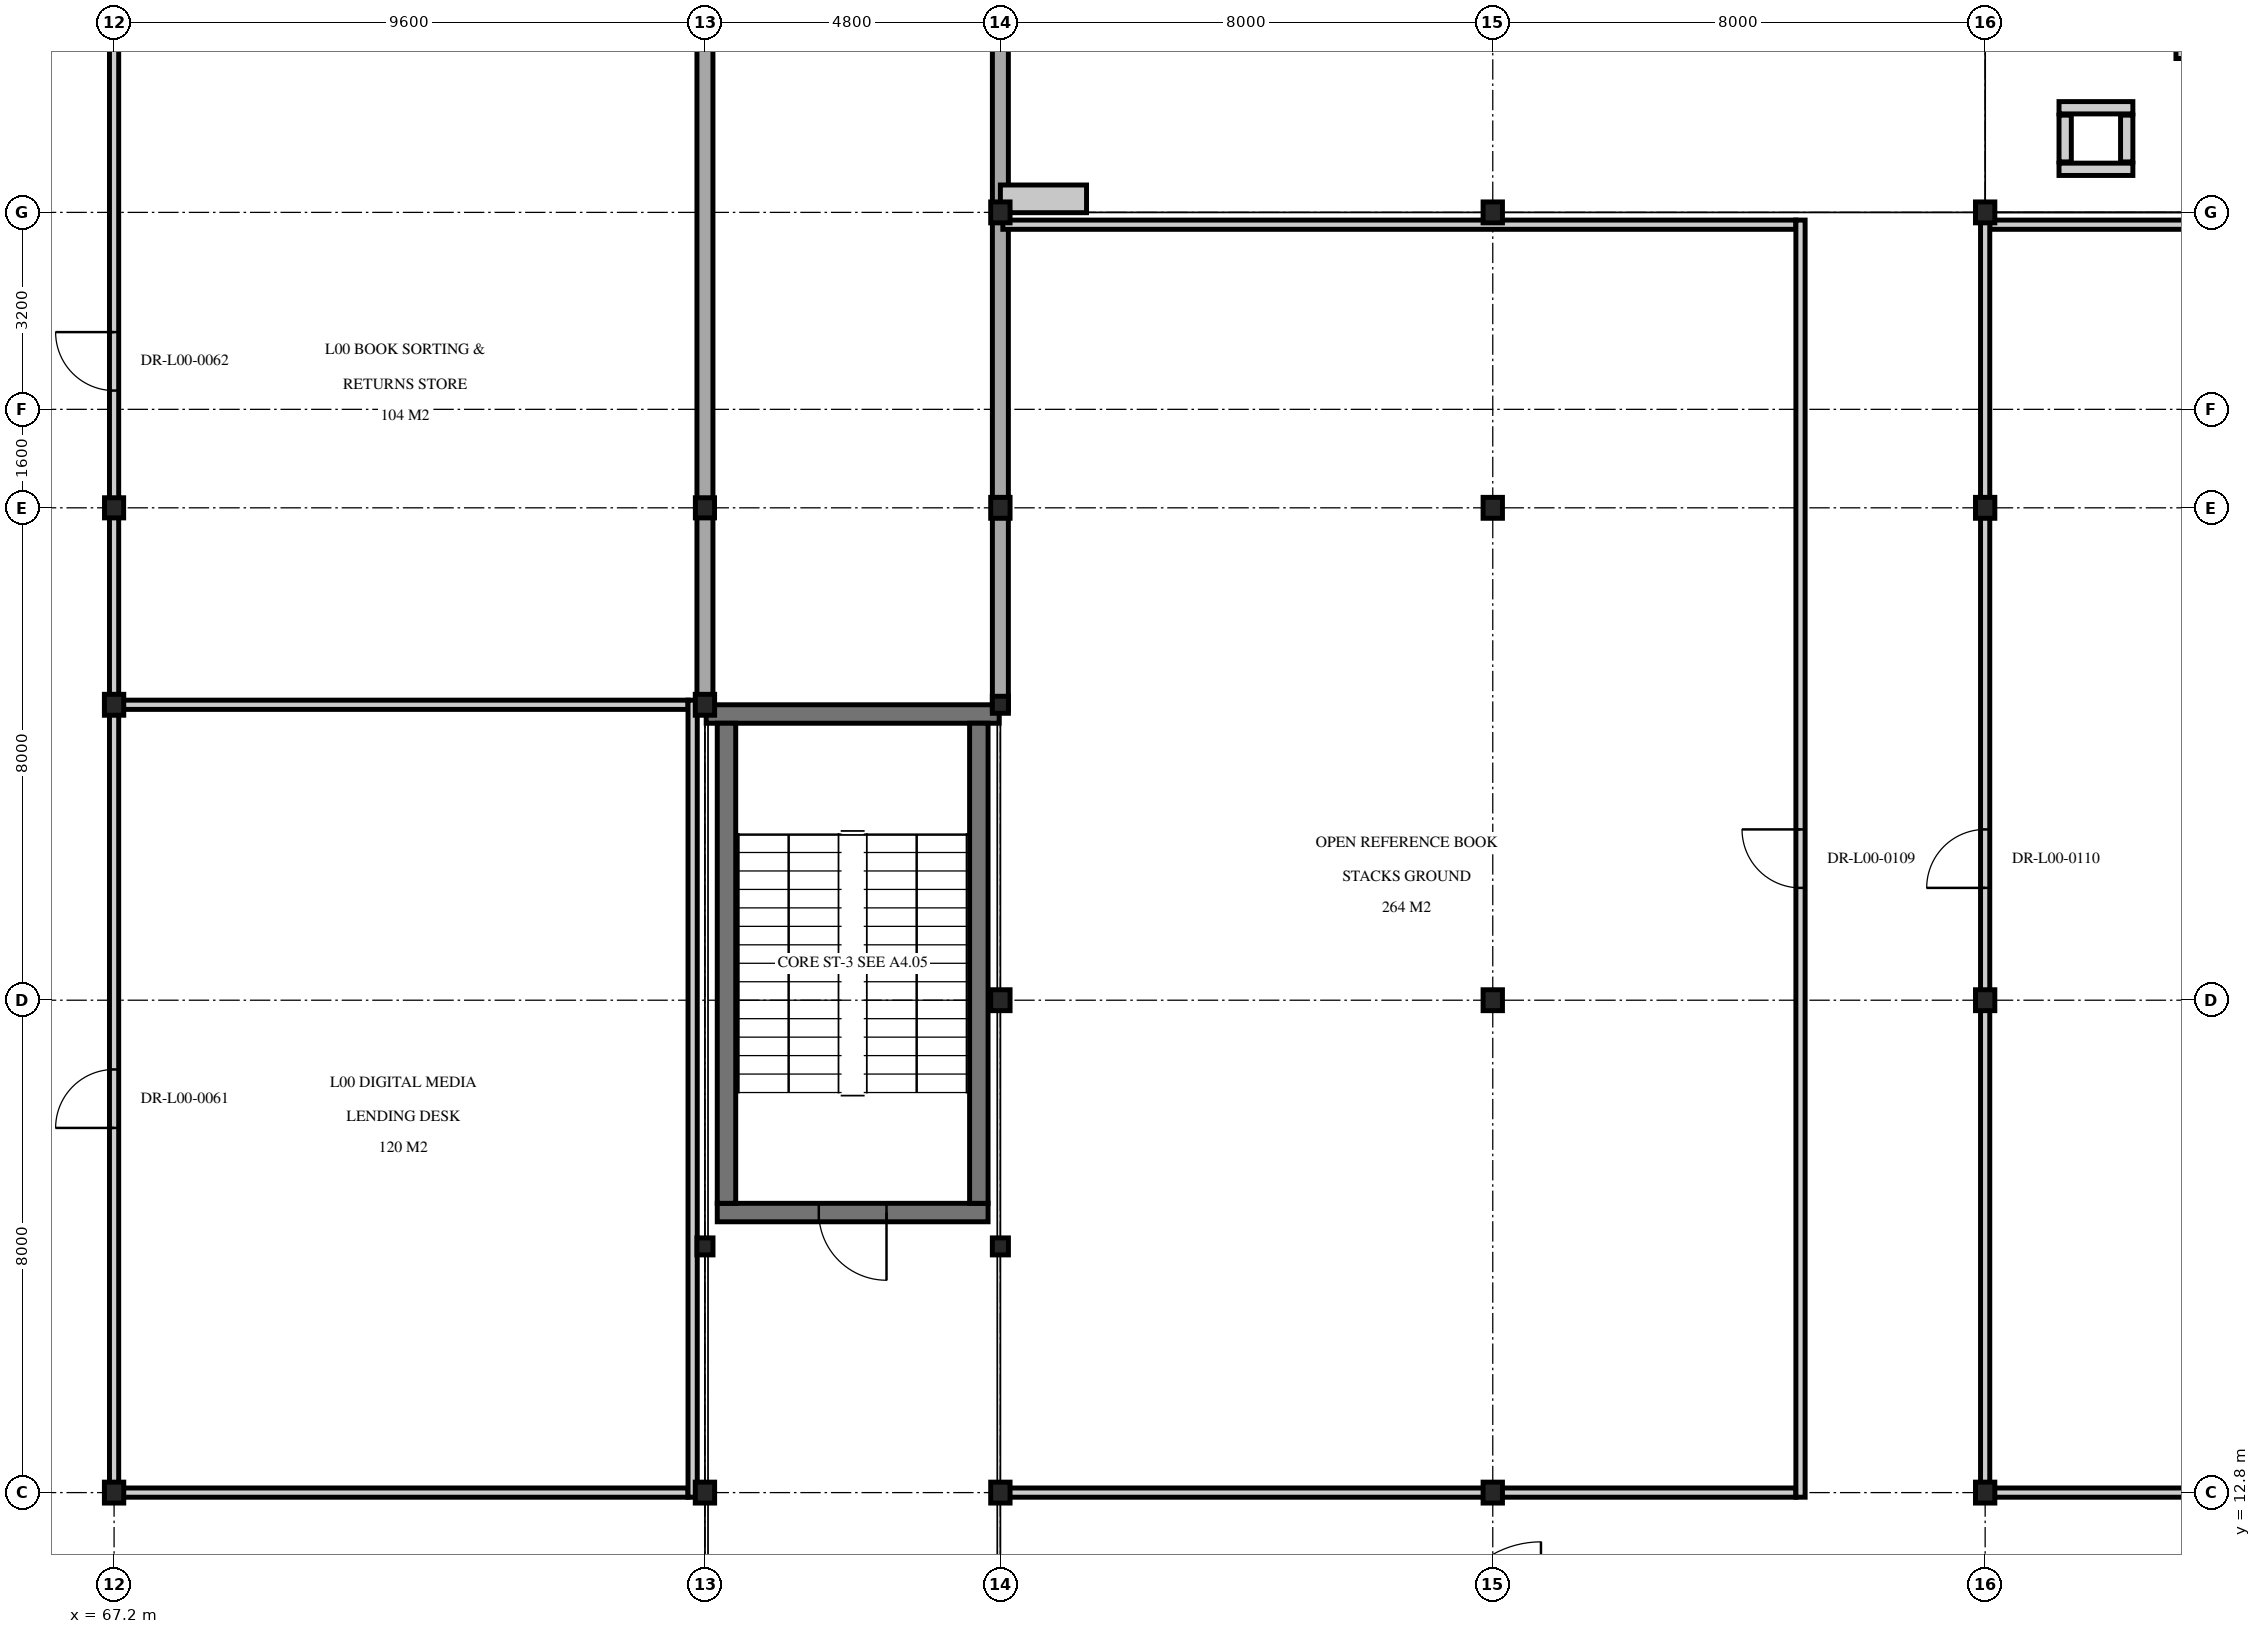
"""IFC4 building model, lengths in metres.
Left out: names, types, materials, properties, quantities, classifications, styles, units other than length and angle.
Written with IfcOpenShell. Run it as: python <this file> out.ifc"""

import sys

from ifc_helpers import new_model, si_unit, direction, frame, frame_2d, origin, origin_2d, place, context, subcontext, project, spatial, rectangle, i_section, extrude, element, fill, save


model = new_model("IFC4")
c1 = context("Model", 3, precision=1e-05, world=origin(), true_north=direction((0.0, 1.0)))
c2 = subcontext(c1, "Body", "Model", "MODEL_VIEW")
j1 = project(units=[si_unit("LENGTHUNIT", "METRE"), si_unit("PLANEANGLEUNIT", "RADIAN")], contexts=[c1])
p1 = place(None, origin())
s1 = spatial("IfcSite", under=j1, at=p1, CompositionType="ELEMENT")
p2 = place(p1, origin())
s2 = spatial("IfcBuilding", under=s1, at=p2, CompositionType="ELEMENT")
p3 = place(p2, origin())
s3 = spatial("IfcBuildingStorey", under=s2, at=p3, CompositionType="ELEMENT", Elevation=0.0)
for number, where, z_axis, x_axis in (
    (1, (67.2, 12.8, 0.0), (0.0, 0.0, 1.0), (1.0, 0.0, 0.0)),
    (2, (67.2, 25.6, 0.0), (0.0, 0.0, 1.0), (1.0, 0.0, 0.0)),
    (3, (76.8, 12.8, 0.0), (0.0, 0.0, 1.0), (1.0, 0.0, 0.0)),
    (4, (76.8, 25.6, 0.0), (0.0, 0.0, 1.0), (1.0, 0.0, 0.0)),
):
    element("IfcColumn", number, at=place(p3, frame(where, z_axis=z_axis, x_axis=x_axis)), inside=s3, PredefinedType="COLUMN", context=c2, shape_type="SweptSolid", body=[
        extrude(i_section(OverallWidth=0.314, OverallDepth=0.34, WebThickness=0.019, FlangeThickness=0.031, at=origin_2d()), origin(), (0.0, 0.0, 1.0), 5.1),
    ])
for number, where, z_axis, x_axis in (
    (5, (67.2, 28.8, 0.0), (0.0, 0.0, 1.0), (1.0, 0.0, 0.0)),
    (6, (76.8, 28.8, 0.0), (0.0, 0.0, 1.0), (1.0, 0.0, 0.0)),
):
    element("IfcColumn", number, at=place(p3, frame(where, z_axis=z_axis, x_axis=x_axis)), inside=s3, PredefinedType="COLUMN", context=c2, shape_type="SweptSolid", body=[
        extrude(i_section(OverallWidth=0.311, OverallDepth=0.327, WebThickness=0.016, FlangeThickness=0.025, at=origin_2d()), origin(), (0.0, 0.0, 1.0), 5.1),
    ])
p4 = place(p3, frame((76.8, 16.8, 0.0), z_axis=(0.0, 0.0, 1.0), x_axis=(1.0, 0.0, 0.0)))
e7 = element("IfcColumn", 7, at=p4, inside=s3, PredefinedType="COLUMN", context=c2, shape_type="SweptSolid", body=[
    extrude(i_section(OverallWidth=0.261, OverallDepth=0.276, WebThickness=0.015, FlangeThickness=0.025, at=origin_2d()), origin(), (0.0, 0.0, 1.0), 5.1),
])
for number, where, z_axis, x_axis in (
    (8, (81.6, 12.8, 0.0), (0.0, 0.0, 1.0), (1.0, 0.0, 0.0)),
    (9, (81.6, 20.8, 0.0), (0.0, 0.0, 1.0), (1.0, 0.0, 0.0)),
    (10, (81.6, 28.8, 0.0), (0.0, 0.0, 1.0), (1.0, 0.0, 0.0)),
    (11, (81.6, 33.6, 0.0), (0.0, 0.0, 1.0), (1.0, 0.0, 0.0)),
    (12, (89.6, 12.8, 0.0), (0.0, 0.0, 1.0), (1.0, 0.0, 0.0)),
    (13, (89.6, 20.8, 0.0), (0.0, 0.0, 1.0), (1.0, 0.0, 0.0)),
    (14, (89.6, 28.8, 0.0), (0.0, 0.0, 1.0), (1.0, 0.0, 0.0)),
    (15, (89.6, 33.6, 0.0), (0.0, 0.0, 1.0), (1.0, 0.0, 0.0)),
    (16, (97.6, 12.8, 0.0), (0.0, 0.0, 1.0), (1.0, 0.0, 0.0)),
    (17, (97.6, 20.8, 0.0), (0.0, 0.0, 1.0), (1.0, 0.0, 0.0)),
    (18, (97.6, 28.8, 0.0), (0.0, 0.0, 1.0), (1.0, 0.0, 0.0)),
    (19, (97.6, 33.6, 0.0), (0.0, 0.0, 1.0), (1.0, 0.0, 0.0)),
):
    element("IfcColumn", number, at=place(p3, frame(where, z_axis=z_axis, x_axis=x_axis)), inside=s3, PredefinedType="COLUMN", context=c2, shape_type="SweptSolid", body=[
        extrude(i_section(OverallWidth=0.314, OverallDepth=0.34, WebThickness=0.019, FlangeThickness=0.031, at=origin_2d()), origin(), (0.0, 0.0, 1.0), 5.1),
    ])
for number, where, z_axis, x_axis in (
    (20, (81.6, 16.8, 0.0), (0.0, 0.0, 1.0), (1.0, 0.0, 0.0)),
    (21, (81.6, 25.6, 0.0), (0.0, 0.0, 1.0), (1.0, 0.0, 0.0)),
):
    element("IfcColumn", number, at=place(p3, frame(where, z_axis=z_axis, x_axis=x_axis)), inside=s3, PredefinedType="COLUMN", context=c2, shape_type="SweptSolid", body=[
        extrude(i_section(OverallWidth=0.261, OverallDepth=0.276, WebThickness=0.015, FlangeThickness=0.025, at=origin_2d()), origin(), (0.0, 0.0, 1.0), 5.1),
    ])
p5 = place(p3, frame((81.4, 17.35, 0.0), z_axis=(0.0, 0.0, 1.0), x_axis=(-1.0, 0.0, 0.0)))
e22 = element("IfcWall", 22, at=p5, inside=s3, PredefinedType="SHEAR", context=c2, shape_type="SweptSolid", body=[
    extrude(rectangle(XDim=4.4, YDim=0.3, at=frame_2d((2.2, 0.0))), origin(), (0.0, 0.0, 1.0), 4.88),
])
p6 = place(p5, frame((1.65, 0.0, 0.0)))
e23 = element("IfcOpeningElement", 23, at=p6, cuts=e22, PredefinedType="OPENING", context=c2, shape_type="SweptSolid", body=[
    extrude(rectangle(XDim=1.1, YDim=2.2, at=frame_2d((0.55, 1.1))), frame((0.0, 0.16, 0.0), z_axis=(0.0, -1.0, 0.0), x_axis=(1.0, 0.0, 0.0)), (0.0, 0.0, 1.0), 0.32),
])
p7 = place(p3, frame((76.82, 25.45, 0.0), z_axis=(0.0, 0.0, 1.0), x_axis=(1.0, 0.0, 0.0)))
e24 = element("IfcWall", 24, at=p7, inside=s3, PredefinedType="SHEAR", context=c2, shape_type="SweptSolid", body=[
    extrude(rectangle(XDim=4.76, YDim=0.3, at=frame_2d((2.38, 0.0))), origin(), (0.0, 0.0, 1.0), 4.88),
])
for number, where, z_axis, x_axis in (
    (25, (77.15, 17.5, 0.0), (0.0, 0.0, 1.0), (0.0, 1.0, 0.0)),
    (26, (81.25, 25.3, 0.0), (0.0, 0.0, 1.0), (0.0, -1.0, 0.0)),
):
    element("IfcWall", number, at=place(p3, frame(where, z_axis=z_axis, x_axis=x_axis)), inside=s3, PredefinedType="SHEAR", context=c2, shape_type="SweptSolid", body=[
        extrude(rectangle(XDim=7.8, YDim=0.3, at=frame_2d((3.9, 0.0))), origin(), (0.0, 0.0, 1.0), 4.88),
    ])
for number, where, z_axis, x_axis in (
    (27, (100.0, 34.3, 0.0), (0.0, 0.0, 1.0), (-1.0, 0.0, 0.0)),
    (28, (98.8, 35.3, 0.0), (0.0, 0.0, 1.0), (1.0, 0.0, 0.0)),
):
    element("IfcWall", number, at=place(p3, frame(where, z_axis=z_axis, x_axis=x_axis)), inside=s3, PredefinedType="PARTITIONING", context=c2, shape_type="SweptSolid", body=[
        extrude(rectangle(XDim=1.2, YDim=0.2, at=frame_2d((0.6, 0.0))), origin(), (0.0, 0.0, 1.0), 4.38),
    ])
for number, where, z_axis, x_axis in (
    (29, (98.9, 34.42, 0.0), (0.0, 0.0, 1.0), (0.0, 1.0, 0.0)),
    (30, (99.9, 35.18, 0.0), (0.0, 0.0, 1.0), (0.0, -1.0, 0.0)),
):
    element("IfcWall", number, at=place(p3, frame(where, z_axis=z_axis, x_axis=x_axis)), inside=s3, PredefinedType="PARTITIONING", context=c2, shape_type="SweptSolid", body=[
        extrude(rectangle(XDim=0.76, YDim=0.2, at=frame_2d((0.38, 0.0))), origin(), (0.0, 0.0, 1.0), 4.38),
    ])
p8 = place(p3, frame((76.8, 36.885, 0.0), z_axis=(0.0, 0.0, 1.0), x_axis=(0.0, -1.0, 0.0)))
e31 = element("IfcWall", 31, at=p8, inside=s3, PredefinedType="SOLIDWALL", context=c2, shape_type="SweptSolid", body=[
    extrude(rectangle(XDim=11.37, YDim=0.26, at=frame_2d((5.685, 0.0))), origin(), (0.0, 0.0, 1.0), 4.315),
])
p9 = place(p3, frame((81.6, 25.515, 0.0), z_axis=(0.0, 0.0, 1.0), x_axis=(0.0, 1.0, 0.0)))
e32 = element("IfcWall", 32, at=p9, inside=s3, PredefinedType="SOLIDWALL", context=c2, shape_type="SweptSolid", body=[
    extrude(rectangle(XDim=8.17, YDim=0.26, at=frame_2d((4.085, 0.0))), origin(), (0.0, 0.0, 1.0), 4.305),
])
p10 = place(p3, frame((81.6, 33.515, 0.0), z_axis=(0.0, 0.0, 1.0), x_axis=(0.0, 1.0, 0.0)))
e33 = element("IfcWall", 33, at=p10, inside=s3, PredefinedType="SOLIDWALL", context=c2, shape_type="SweptSolid", body=[
    extrude(rectangle(XDim=3.37, YDim=0.26, at=frame_2d((1.685, 0.0))), origin(), (0.0, 0.0, 1.0), 4.305),
])
for number, where, z_axis, x_axis in (
    (34, (67.275, 12.8, 0.0), (0.0, 0.0, 1.0), (1.0, 0.0, 0.0)),
    (35, (67.275, 25.6, 0.0), (0.0, 0.0, 1.0), (1.0, 0.0, 0.0)),
):
    element("IfcWall", number, at=place(p3, frame(where, z_axis=z_axis, x_axis=x_axis)), inside=s3, PredefinedType="PARTITIONING", context=c2, shape_type="SweptSolid", body=[
        extrude(rectangle(XDim=9.25, YDim=0.15, at=frame_2d((4.625, 0.0))), origin(), (0.0, 0.0, 1.0), 4.315),
    ])
p11 = place(p3, frame((67.2, 12.725, 0.0), z_axis=(0.0, 0.0, 1.0), x_axis=(0.0, 1.0, 0.0)))
e36 = element("IfcWall", 36, at=p11, inside=s3, PredefinedType="PARTITIONING", context=c2, shape_type="SweptSolid", body=[
    extrude(rectangle(XDim=12.95, YDim=0.15, at=frame_2d((6.475, 0.0))), origin(), (0.0, 0.0, 1.0), 4.315),
])
p12 = place(p11, frame((6.0, 0.0, 0.0)))
e37 = element("IfcOpeningElement", 37, at=p12, cuts=e36, PredefinedType="OPENING", context=c2, shape_type="SweptSolid", body=[
    extrude(rectangle(XDim=0.95, YDim=2.15, at=frame_2d((0.475, 1.075))), frame((0.0, 0.085, 0.0), z_axis=(0.0, -1.0, 0.0), x_axis=(1.0, 0.0, 0.0)), (0.0, 0.0, 1.0), 0.17),
])
p13 = place(p3, frame((76.6, 12.725, 0.0), z_axis=(0.0, 0.0, 1.0), x_axis=(0.0, 1.0, 0.0)))
e38 = element("IfcWall", 38, at=p13, inside=s3, PredefinedType="PARTITIONING", context=c2, shape_type="SweptSolid", body=[
    extrude(rectangle(XDim=12.95, YDim=0.15, at=frame_2d((6.475, 0.0))), origin(), (0.0, 0.0, 1.0), 4.315),
])
p14 = place(p3, frame((67.2, 25.6, 0.0), z_axis=(0.0, 0.0, 1.0), x_axis=(0.0, 1.0, 0.0)))
e39 = element("IfcWall", 39, at=p14, inside=s3, PredefinedType="PARTITIONING", context=c2, shape_type="SweptSolid", body=[
    extrude(rectangle(XDim=11.16, YDim=0.15, at=frame_2d((5.58, 0.0))), origin(), (0.0, 0.0, 1.0), 4.315),
])
p15 = place(p14, frame((5.105, 0.0, 0.0)))
e40 = element("IfcOpeningElement", 40, at=p15, cuts=e39, PredefinedType="OPENING", context=c2, shape_type="SweptSolid", body=[
    extrude(rectangle(XDim=0.95, YDim=2.15, at=frame_2d((0.475, 1.075))), frame((0.0, 0.085, 0.0), z_axis=(0.0, -1.0, 0.0), x_axis=(1.0, 0.0, 0.0)), (0.0, 0.0, 1.0), 0.17),
])
for number, where, z_axis, x_axis in (
    (41, (81.64, 12.8, 0.0), (0.0, 0.0, 1.0), (1.0, 0.0, 0.0)),
    (42, (81.64, 33.4, 0.0), (0.0, 0.0, 1.0), (1.0, 0.0, 0.0)),
):
    element("IfcWall", number, at=place(p3, frame(where, z_axis=z_axis, x_axis=x_axis)), inside=s3, PredefinedType="PARTITIONING", context=c2, shape_type="SweptSolid", body=[
        extrude(rectangle(XDim=12.885, YDim=0.15, at=frame_2d((6.442, 0.0))), origin(), (0.0, 0.0, 1.0), 4.305),
    ])
p16 = place(p3, frame((94.6, 12.725, 0.0), z_axis=(0.0, 0.0, 1.0), x_axis=(0.0, 1.0, 0.0)))
e43 = element("IfcWall", 43, at=p16, inside=s3, PredefinedType="PARTITIONING", context=c2, shape_type="SweptSolid", body=[
    extrude(rectangle(XDim=20.75, YDim=0.15, at=frame_2d((10.375, 0.0))), origin(), (0.0, 0.0, 1.0), 4.305),
])
p17 = place(p16, frame((9.9, 0.0, 0.0)))
e44 = element("IfcOpeningElement", 44, at=p17, cuts=e43, PredefinedType="OPENING", context=c2, shape_type="SweptSolid", body=[
    extrude(rectangle(XDim=0.95, YDim=2.15, at=frame_2d((0.475, 1.075))), frame((0.0, 0.085, 0.0), z_axis=(0.0, -1.0, 0.0), x_axis=(1.0, 0.0, 0.0)), (0.0, 0.0, 1.0), 0.17),
])
for number, where, z_axis, x_axis in (
    (45, (97.675, 12.8, 0.0), (0.0, 0.0, 1.0), (1.0, 0.0, 0.0)),
    (46, (97.675, 33.4, 0.0), (0.0, 0.0, 1.0), (1.0, 0.0, 0.0)),
):
    element("IfcWall", number, at=place(p3, frame(where, z_axis=z_axis, x_axis=x_axis)), inside=s3, PredefinedType="PARTITIONING", context=c2, shape_type="SweptSolid", body=[
        extrude(rectangle(XDim=19.05, YDim=0.15, at=frame_2d((9.525, 0.0))), origin(), (0.0, 0.0, 1.0), 4.305),
    ])
p18 = place(p3, frame((97.6, 12.725, 0.0), z_axis=(0.0, 0.0, 1.0), x_axis=(0.0, 1.0, 0.0)))
e47 = element("IfcWall", 47, at=p18, inside=s3, PredefinedType="PARTITIONING", context=c2, shape_type="SweptSolid", body=[
    extrude(rectangle(XDim=20.75, YDim=0.15, at=frame_2d((10.375, 0.0))), origin(), (0.0, 0.0, 1.0), 4.305),
])
p19 = place(p18, frame((9.9, 0.0, 0.0)))
e48 = element("IfcOpeningElement", 48, at=p19, cuts=e47, PredefinedType="OPENING", context=c2, shape_type="SweptSolid", body=[
    extrude(rectangle(XDim=0.95, YDim=2.15, at=frame_2d((0.475, 1.075))), frame((0.0, 0.085, 0.0), z_axis=(0.0, -1.0, 0.0), x_axis=(1.0, 0.0, 0.0)), (0.0, 0.0, 1.0), 0.17),
])
p20 = place(p3, frame((100.8, 36.1, 0.0), z_axis=(0.0, 0.0, 1.0), x_axis=(0.0, 1.0, 0.0)))
e49 = element("IfcWall", 49, at=p20, inside=s3, PredefinedType="PARTITIONING", context=c2, shape_type="SweptSolid", body=[
    extrude(rectangle(XDim=9.2, YDim=0.2, at=frame_2d((4.6, 0.0))), origin(), (0.0, 0.0, 1.0), 4.5),
])
p21 = place(p20, frame((3.8, 0.0, 0.0)))
e50 = element("IfcOpeningElement", 50, at=p21, cuts=e49, PredefinedType="OPENING", context=c2, shape_type="SweptSolid", body=[
    extrude(rectangle(XDim=1.6, YDim=2.25, at=frame_2d((0.8, 1.125))), frame((0.0, 0.11, 0.0), z_axis=(0.0, -1.0, 0.0), x_axis=(1.0, 0.0, 0.0)), (0.0, 0.0, 1.0), 0.22),
])
p22 = place(p6, origin())
e51 = element("IfcDoor", 51, at=p22, inside=s3, OperationType="SINGLE_SWING_LEFT", PredefinedType="DOOR", context=c2, shape_type="SweptSolid", body=[
    extrude(rectangle(XDim=1.1, YDim=2.2, at=frame_2d((0.55, 1.1))), frame((0.0, 0.025, 0.0), z_axis=(0.0, -1.0, 0.0), x_axis=(1.0, 0.0, 0.0)), (0.0, 0.0, 1.0), 0.05),
])
fill(e23, e51)
p23 = place(p12, origin())
e52 = element("IfcDoor", 52, at=p23, inside=s3, OperationType="SINGLE_SWING_LEFT", PredefinedType="DOOR", context=c2, shape_type="SweptSolid", body=[
    extrude(rectangle(XDim=0.95, YDim=2.15, at=frame_2d((0.475, 1.075))), frame((0.0, 0.025, 0.0), z_axis=(0.0, -1.0, 0.0), x_axis=(1.0, 0.0, 0.0)), (0.0, 0.0, 1.0), 0.05),
])
fill(e37, e52)
p24 = place(p15, origin())
e53 = element("IfcDoor", 53, at=p24, inside=s3, OperationType="SINGLE_SWING_RIGHT", PredefinedType="DOOR", context=c2, shape_type="SweptSolid", body=[
    extrude(rectangle(XDim=0.95, YDim=2.15, at=frame_2d((0.475, 1.075))), frame((0.0, 0.025, 0.0), z_axis=(0.0, -1.0, 0.0), x_axis=(1.0, 0.0, 0.0)), (0.0, 0.0, 1.0), 0.05),
])
fill(e40, e53)
p25 = place(p17, origin())
e54 = element("IfcDoor", 54, at=p25, inside=s3, OperationType="SINGLE_SWING_RIGHT", PredefinedType="DOOR", context=c2, shape_type="SweptSolid", body=[
    extrude(rectangle(XDim=0.95, YDim=2.15, at=frame_2d((0.475, 1.075))), frame((0.0, 0.025, 0.0), z_axis=(0.0, -1.0, 0.0), x_axis=(1.0, 0.0, 0.0)), (0.0, 0.0, 1.0), 0.05),
])
fill(e44, e54)
p26 = place(p19, origin())
e55 = element("IfcDoor", 55, at=p26, inside=s3, OperationType="SINGLE_SWING_LEFT", PredefinedType="DOOR", context=c2, shape_type="SweptSolid", body=[
    extrude(rectangle(XDim=0.95, YDim=2.15, at=frame_2d((0.475, 1.075))), frame((0.0, 0.025, 0.0), z_axis=(0.0, -1.0, 0.0), x_axis=(1.0, 0.0, 0.0)), (0.0, 0.0, 1.0), 0.05),
])
fill(e48, e55)
save(model, sys.argv[1])
